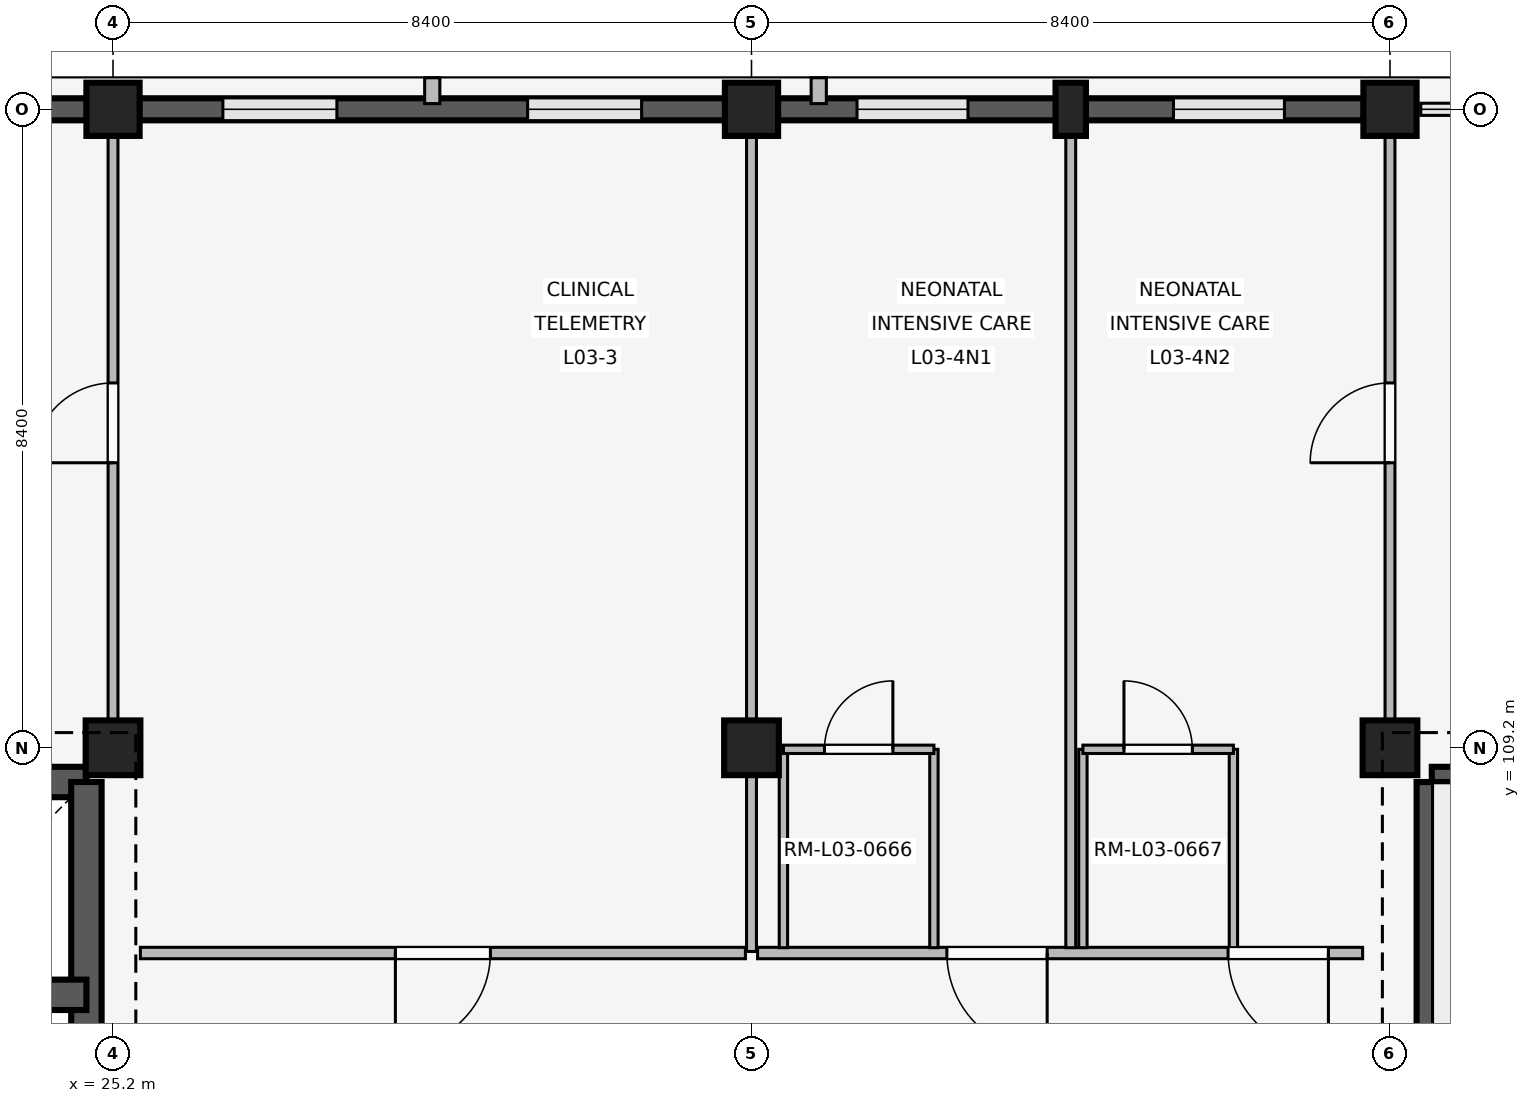
"""IFC4 building model, lengths in metres.
Left out: names, types, materials, properties, quantities, classifications, styles, units other than length and angle.
Written with IfcOpenShell. Run it as: python <this file> out.ifc"""

import sys

from ifc_helpers import new_model, si_unit, direction, frame, frame_2d, origin, origin_2d, place, context, subcontext, project, spatial, rectangle, extrude, element, fill, save


model = new_model("IFC4")
c1 = context("Model", 3, precision=1e-05, world=origin(), true_north=direction((0.0, 1.0)))
c2 = subcontext(c1, "Body", "Model", "MODEL_VIEW")
j1 = project(units=[si_unit("LENGTHUNIT", "METRE"), si_unit("PLANEANGLEUNIT", "RADIAN")], contexts=[c1])
p1 = place(None, origin())
s1 = spatial("IfcSite", under=j1, at=p1, CompositionType="ELEMENT")
p2 = place(p1, origin())
s2 = spatial("IfcBuilding", under=s1, at=p2, CompositionType="ELEMENT")
p3 = place(p2, frame((0.0, 0.0, 12.9)))
s3 = spatial("IfcBuildingStorey", under=s2, at=p3, CompositionType="ELEMENT", Elevation=12.9)
p4 = place(p3, frame((25.2, 109.2, 0.0), z_axis=(0.0, 0.0, 1.0), x_axis=(1.0, 0.0, 0.0)))
e1 = element("IfcColumn", 1, at=p4, inside=s3, PredefinedType="COLUMN", context=c2, shape_type="SweptSolid", body=[
    extrude(rectangle(XDim=0.72, YDim=0.72, at=origin_2d()), origin(), (0.0, 0.0, 1.0), 3.3),
])
p5 = place(p3, frame((25.2, 117.6, 0.0), z_axis=(0.0, 0.0, 1.0), x_axis=(1.0, 0.0, 0.0)))
e2 = element("IfcColumn", 2, at=p5, inside=s3, PredefinedType="COLUMN", context=c2, shape_type="SweptSolid", body=[
    extrude(rectangle(XDim=0.7, YDim=0.7, at=origin_2d()), origin(), (0.0, 0.0, 1.0), 3.3),
])
p6 = place(p3, frame((33.6, 109.2, 0.0), z_axis=(0.0, 0.0, 1.0), x_axis=(1.0, 0.0, 0.0)))
e3 = element("IfcColumn", 3, at=p6, inside=s3, PredefinedType="COLUMN", context=c2, shape_type="SweptSolid", body=[
    extrude(rectangle(XDim=0.72, YDim=0.72, at=origin_2d()), origin(), (0.0, 0.0, 1.0), 3.3),
])
p7 = place(p3, frame((33.6, 117.6, 0.0), z_axis=(0.0, 0.0, 1.0), x_axis=(1.0, 0.0, 0.0)))
e4 = element("IfcColumn", 4, at=p7, inside=s3, PredefinedType="COLUMN", context=c2, shape_type="SweptSolid", body=[
    extrude(rectangle(XDim=0.7, YDim=0.7, at=origin_2d()), origin(), (0.0, 0.0, 1.0), 3.3),
])
p8 = place(p3, frame((42.0, 109.2, 0.0), z_axis=(0.0, 0.0, 1.0), x_axis=(1.0, 0.0, 0.0)))
e5 = element("IfcColumn", 5, at=p8, inside=s3, PredefinedType="COLUMN", context=c2, shape_type="SweptSolid", body=[
    extrude(rectangle(XDim=0.72, YDim=0.72, at=origin_2d()), origin(), (0.0, 0.0, 1.0), 3.3),
])
p9 = place(p3, frame((42.0, 117.6, 0.0), z_axis=(0.0, 0.0, 1.0), x_axis=(1.0, 0.0, 0.0)))
e6 = element("IfcColumn", 6, at=p9, inside=s3, PredefinedType="COLUMN", context=c2, shape_type="SweptSolid", body=[
    extrude(rectangle(XDim=0.7, YDim=0.7, at=origin_2d()), origin(), (0.0, 0.0, 1.0), 3.3),
])
p10 = place(p3, frame((37.8, 117.6, 0.0), z_axis=(0.0, 0.0, 1.0), x_axis=(1.0, 0.0, 0.0)))
e7 = element("IfcColumn", 7, at=p10, inside=s3, PredefinedType="PILASTER", context=c2, shape_type="SweptSolid", body=[
    extrude(rectangle(XDim=0.4, YDim=0.7, at=origin_2d()), origin(), (0.0, 0.0, 1.0), 3.3),
])
p11 = place(p3, frame((17.145, 117.6, 0.0), z_axis=(0.0, 0.0, 1.0), x_axis=(1.0, 0.0, 0.0)))
e8 = element("IfcWall", 8, at=p11, inside=s3, PredefinedType="SOLIDWALL", context=c2, shape_type="SweptSolid", body=[
    extrude(rectangle(XDim=7.71, YDim=0.29, at=frame_2d((3.855, 0.0))), origin(), (0.0, 0.0, 1.0), 2.44),
])
p12 = place(p11, frame((1.123, 0.0, 1.05)))
e9 = element("IfcOpeningElement", 9, at=p12, cuts=e8, PredefinedType="OPENING", context=c2, shape_type="SweptSolid", body=[
    extrude(rectangle(XDim=1.3, YDim=0.75, at=frame_2d((0.65, 0.375))), frame((0.0, 0.155, 0.0), z_axis=(0.0, -1.0, 0.0), x_axis=(1.0, 0.0, 0.0)), (0.0, 0.0, 1.0), 0.31),
])
p13 = place(p11, frame((5.287, 0.0, 1.05)))
e10 = element("IfcOpeningElement", 10, at=p13, cuts=e8, PredefinedType="OPENING", context=c2, shape_type="SweptSolid", body=[
    extrude(rectangle(XDim=1.3, YDim=0.75, at=frame_2d((0.65, 0.375))), frame((0.0, 0.155, 0.0), z_axis=(0.0, -1.0, 0.0), x_axis=(1.0, 0.0, 0.0)), (0.0, 0.0, 1.0), 0.31),
])
p14 = place(p3, frame((25.545, 117.6, 0.0), z_axis=(0.0, 0.0, 1.0), x_axis=(1.0, 0.0, 0.0)))
e11 = element("IfcWall", 11, at=p14, inside=s3, PredefinedType="SOLIDWALL", context=c2, shape_type="SweptSolid", body=[
    extrude(rectangle(XDim=7.71, YDim=0.29, at=frame_2d((3.855, 0.0))), origin(), (0.0, 0.0, 1.0), 2.44),
])
p15 = place(p14, frame((1.1, 0.0, 1.05)))
e12 = element("IfcOpeningElement", 12, at=p15, cuts=e11, PredefinedType="OPENING", context=c2, shape_type="SweptSolid", body=[
    extrude(rectangle(XDim=1.5, YDim=0.75, at=frame_2d((0.75, 0.375))), frame((0.0, 0.155, 0.0), z_axis=(0.0, -1.0, 0.0), x_axis=(1.0, 0.0, 0.0)), (0.0, 0.0, 1.0), 0.31),
])
p16 = place(p14, frame((5.11, 0.0, 1.05)))
e13 = element("IfcOpeningElement", 13, at=p16, cuts=e11, PredefinedType="OPENING", context=c2, shape_type="SweptSolid", body=[
    extrude(rectangle(XDim=1.5, YDim=0.75, at=frame_2d((0.75, 0.375))), frame((0.0, 0.155, 0.0), z_axis=(0.0, -1.0, 0.0), x_axis=(1.0, 0.0, 0.0)), (0.0, 0.0, 1.0), 0.31),
])
p17 = place(p3, frame((29.4, 117.675, 0.0), z_axis=(0.0, 0.0, 1.0), x_axis=(0.0, 1.0, 0.0)))
e14 = element("IfcWall", 14, at=p17, inside=s3, PredefinedType="ELEMENTEDWALL", context=c2, shape_type="SweptSolid", body=[
    extrude(rectangle(XDim=0.34, YDim=0.2, at=frame_2d((0.17, 0.0))), origin(), (0.0, 0.0, 1.0), 2.42),
])
p18 = place(p3, frame((33.945, 117.6, 0.0), z_axis=(0.0, 0.0, 1.0), x_axis=(1.0, 0.0, 0.0)))
e15 = element("IfcWall", 15, at=p18, inside=s3, PredefinedType="SOLIDWALL", context=c2, shape_type="SweptSolid", body=[
    extrude(rectangle(XDim=7.71, YDim=0.29, at=frame_2d((3.855, 0.0))), origin(), (0.0, 0.0, 1.0), 2.44),
])
p19 = place(p18, frame((1.043, 0.0, 0.85)))
e16 = element("IfcOpeningElement", 16, at=p19, cuts=e15, PredefinedType="OPENING", context=c2, shape_type="SweptSolid", body=[
    extrude(rectangle(XDim=1.46, YDim=0.85, at=frame_2d((0.73, 0.425))), frame((0.0, 0.155, 0.0), z_axis=(0.0, -1.0, 0.0), x_axis=(1.0, 0.0, 0.0)), (0.0, 0.0, 1.0), 0.31),
])
p20 = place(p18, frame((5.207, 0.0, 0.85)))
e17 = element("IfcOpeningElement", 17, at=p20, cuts=e15, PredefinedType="OPENING", context=c2, shape_type="SweptSolid", body=[
    extrude(rectangle(XDim=1.46, YDim=0.85, at=frame_2d((0.73, 0.425))), frame((0.0, 0.155, 0.0), z_axis=(0.0, -1.0, 0.0), x_axis=(1.0, 0.0, 0.0)), (0.0, 0.0, 1.0), 0.31),
])
p21 = place(p3, frame((34.485, 117.675, 0.0), z_axis=(0.0, 0.0, 1.0), x_axis=(0.0, 1.0, 0.0)))
e18 = element("IfcWall", 18, at=p21, inside=s3, PredefinedType="ELEMENTEDWALL", context=c2, shape_type="SweptSolid", body=[
    extrude(rectangle(XDim=0.34, YDim=0.2, at=frame_2d((0.17, 0.0))), origin(), (0.0, 0.0, 1.0), 2.42),
])
p22 = place(p3, frame((42.55, 108.75, 0.0), z_axis=(0.0, 0.0, 1.0), x_axis=(1.0, 0.0, 0.0)))
e19 = element("IfcWall", 19, at=p22, inside=s3, PredefinedType="SHEAR", context=c2, shape_type="SweptSolid", body=[
    extrude(rectangle(XDim=7.5, YDim=0.4, at=frame_2d((3.75, 0.0))), origin(), (0.0, 0.0, 1.0), 3.02),
])
p23 = place(p3, frame((42.55, 101.2, 0.0), z_axis=(0.0, 0.0, 1.0), x_axis=(0.0, 1.0, 0.0)))
e20 = element("IfcWall", 20, at=p23, inside=s3, PredefinedType="SHEAR", context=c2, shape_type="SweptSolid", body=[
    extrude(rectangle(XDim=7.55, YDim=0.4, at=frame_2d((3.775, 0.0))), origin(), (0.0, 0.0, 1.0), 3.02),
])
p24 = place(p23, frame((0.28, 0.0, 0.0)))
e21 = element("IfcOpeningElement", 21, at=p24, cuts=e20, PredefinedType="OPENING", context=c2, shape_type="SweptSolid", body=[
    extrude(rectangle(XDim=1.0, YDim=2.15, at=frame_2d((0.5, 1.075))), frame((0.0, 0.21, 0.0), z_axis=(0.0, -1.0, 0.0), x_axis=(1.0, 0.0, 0.0)), (0.0, 0.0, 1.0), 0.42),
])
p25 = place(p3, frame((17.35, 108.75, 0.0), z_axis=(0.0, 0.0, 1.0), x_axis=(1.0, 0.0, 0.0)))
e22 = element("IfcWall", 22, at=p25, inside=s3, PredefinedType="SHEAR", context=c2, shape_type="SweptSolid", body=[
    extrude(rectangle(XDim=7.5, YDim=0.4, at=frame_2d((3.75, 0.0))), origin(), (0.0, 0.0, 1.0), 3.02),
])
p26 = place(p3, frame((24.85, 101.2, 0.0), z_axis=(0.0, 0.0, 1.0), x_axis=(0.0, 1.0, 0.0)))
e23 = element("IfcWall", 23, at=p26, inside=s3, PredefinedType="SHEAR", context=c2, shape_type="SweptSolid", body=[
    extrude(rectangle(XDim=7.55, YDim=0.4, at=frame_2d((3.775, 0.0))), origin(), (0.0, 0.0, 1.0), 3.02),
])
p27 = place(p26, frame((2.4, 0.0, 0.0)))
e24 = element("IfcOpeningElement", 24, at=p27, cuts=e23, PredefinedType="OPENING", context=c2, shape_type="SweptSolid", body=[
    extrude(rectangle(XDim=1.2, YDim=2.2, at=frame_2d((0.6, 1.1))), frame((0.0, 0.21, 0.0), z_axis=(0.0, -1.0, 0.0), x_axis=(1.0, 0.0, 0.0)), (0.0, 0.0, 1.0), 0.42),
])
p28 = place(p3, frame((21.05, 105.95, 0.0), z_axis=(0.0, 0.0, 1.0), x_axis=(1.0, 0.0, 0.0)))
e25 = element("IfcWall", 25, at=p28, inside=s3, PredefinedType="SHEAR", context=c2, shape_type="SweptSolid", body=[
    extrude(rectangle(XDim=3.8, YDim=0.4, at=frame_2d((1.9, 0.0))), origin(), (0.0, 0.0, 1.0), 3.02),
])
p29 = place(p28, frame((0.32, 0.0, 0.0)))
e26 = element("IfcOpeningElement", 26, at=p29, cuts=e25, PredefinedType="OPENING", context=c2, shape_type="SweptSolid", body=[
    extrude(rectangle(XDim=1.1, YDim=2.15, at=frame_2d((0.55, 1.075))), frame((0.0, 0.21, 0.0), z_axis=(0.0, -1.0, 0.0), x_axis=(1.0, 0.0, 0.0)), (0.0, 0.0, 1.0), 0.42),
])
p30 = place(p3, frame((25.2, 109.55, 0.0), z_axis=(0.0, 0.0, 1.0), x_axis=(0.0, 1.0, 0.0)))
e27 = element("IfcWall", 27, at=p30, inside=s3, PredefinedType="PARTITIONING", context=c2, shape_type="SweptSolid", body=[
    extrude(rectangle(XDim=7.91, YDim=0.13, at=frame_2d((3.955, 0.0))), origin(), (0.0, 0.0, 1.0), 2.42),
])
p31 = place(p30, frame((3.4, 0.0, 0.0)))
e28 = element("IfcOpeningElement", 28, at=p31, cuts=e27, PredefinedType="OPENING", context=c2, shape_type="SweptSolid", body=[
    extrude(rectangle(XDim=1.05, YDim=2.2, at=frame_2d((0.525, 1.1))), frame((0.0, 0.075, 0.0), z_axis=(0.0, -1.0, 0.0), x_axis=(1.0, 0.0, 0.0)), (0.0, 0.0, 1.0), 0.15),
])
p32 = place(p3, frame((33.52, 106.5, 0.0), z_axis=(0.0, 0.0, 1.0), x_axis=(-1.0, 0.0, 0.0)))
e29 = element("IfcWall", 29, at=p32, inside=s3, PredefinedType="PARTITIONING", context=c2, shape_type="SweptSolid", body=[
    extrude(rectangle(XDim=7.96, YDim=0.15, at=frame_2d((3.98, 0.0))), origin(), (0.0, 0.0, 1.0), 2.42),
])
p33 = place(p32, frame((3.355, 0.0, 0.0)))
e30 = element("IfcOpeningElement", 30, at=p33, cuts=e29, PredefinedType="OPENING", context=c2, shape_type="SweptSolid", body=[
    extrude(rectangle(XDim=1.25, YDim=2.2, at=frame_2d((0.625, 1.1))), frame((0.0, 0.085, 0.0), z_axis=(0.0, -1.0, 0.0), x_axis=(1.0, 0.0, 0.0)), (0.0, 0.0, 1.0), 0.17),
])
p34 = place(p3, frame((33.6, 106.52, 0.0), z_axis=(0.0, 0.0, 1.0), x_axis=(0.0, 1.0, 0.0)))
e31 = element("IfcWall", 31, at=p34, inside=s3, PredefinedType="PARTITIONING", context=c2, shape_type="SweptSolid", body=[
    extrude(rectangle(XDim=10.94, YDim=0.13, at=frame_2d((5.47, 0.0))), origin(), (0.0, 0.0, 1.0), 2.42),
])
p35 = place(p3, frame((41.64, 106.5, 0.0), z_axis=(0.0, 0.0, 1.0), x_axis=(-1.0, 0.0, 0.0)))
e32 = element("IfcWall", 32, at=p35, inside=s3, PredefinedType="PARTITIONING", context=c2, shape_type="SweptSolid", body=[
    extrude(rectangle(XDim=7.96, YDim=0.15, at=frame_2d((3.98, 0.0))), origin(), (0.0, 0.0, 1.0), 2.42),
])
p36 = place(p35, frame((0.45, 0.0, 0.0)))
e33 = element("IfcOpeningElement", 33, at=p36, cuts=e32, PredefinedType="OPENING", context=c2, shape_type="SweptSolid", body=[
    extrude(rectangle(XDim=1.32, YDim=2.25, at=frame_2d((0.66, 1.125))), frame((0.0, 0.085, 0.0), z_axis=(0.0, -1.0, 0.0), x_axis=(1.0, 0.0, 0.0)), (0.0, 0.0, 1.0), 0.17),
])
p37 = place(p35, frame((4.15, 0.0, 0.0)))
e34 = element("IfcOpeningElement", 34, at=p37, cuts=e32, PredefinedType="OPENING", context=c2, shape_type="SweptSolid", body=[
    extrude(rectangle(XDim=1.32, YDim=2.25, at=frame_2d((0.66, 1.125))), frame((0.0, 0.085, 0.0), z_axis=(0.0, -1.0, 0.0), x_axis=(1.0, 0.0, 0.0)), (0.0, 0.0, 1.0), 0.17),
])
p38 = place(p3, frame((37.8, 106.57, 0.0), z_axis=(0.0, 0.0, 1.0), x_axis=(0.0, 1.0, 0.0)))
e35 = element("IfcWall", 35, at=p38, inside=s3, PredefinedType="PARTITIONING", context=c2, shape_type="SweptSolid", body=[
    extrude(rectangle(XDim=10.93, YDim=0.13, at=frame_2d((5.465, 0.0))), origin(), (0.0, 0.0, 1.0), 2.42),
])
for number, where, z_axis, x_axis in (
    (36, (34.02, 106.57, 0.0), (0.0, 0.0, 1.0), (0.0, 1.0, 0.0)),
    (37, (36.0, 106.57, 0.0), (0.0, 0.0, 1.0), (0.0, 1.0, 0.0)),
):
    element("IfcWall", number, at=place(p3, frame(where, z_axis=z_axis, x_axis=x_axis)), inside=s3, PredefinedType="PARTITIONING", context=c2, shape_type="SweptSolid", body=[
        extrude(rectangle(XDim=2.61, YDim=0.11, at=frame_2d((1.305, 0.0))), origin(), (0.0, 0.0, 1.0), 2.42),
    ])
p39 = place(p3, frame((34.02, 109.18, 0.0), z_axis=(0.0, 0.0, 1.0), x_axis=(1.0, 0.0, 0.0)))
e38 = element("IfcWall", 38, at=p39, inside=s3, PredefinedType="PARTITIONING", context=c2, shape_type="SweptSolid", body=[
    extrude(rectangle(XDim=1.98, YDim=0.11, at=frame_2d((0.99, 0.0))), origin(), (0.0, 0.0, 1.0), 2.42),
])
p40 = place(p39, frame((0.54, 0.0, 0.0)))
e39 = element("IfcOpeningElement", 39, at=p40, cuts=e38, PredefinedType="OPENING", context=c2, shape_type="SweptSolid", body=[
    extrude(rectangle(XDim=0.9, YDim=2.1, at=frame_2d((0.45, 1.05))), frame((0.0, 0.065, 0.0), z_axis=(0.0, -1.0, 0.0), x_axis=(1.0, 0.0, 0.0)), (0.0, 0.0, 1.0), 0.13),
])
for number, where, z_axis, x_axis in (
    (40, (37.96, 106.57, 0.0), (0.0, 0.0, 1.0), (0.0, 1.0, 0.0)),
    (41, (39.94, 106.57, 0.0), (0.0, 0.0, 1.0), (0.0, 1.0, 0.0)),
):
    element("IfcWall", number, at=place(p3, frame(where, z_axis=z_axis, x_axis=x_axis)), inside=s3, PredefinedType="PARTITIONING", context=c2, shape_type="SweptSolid", body=[
        extrude(rectangle(XDim=2.61, YDim=0.11, at=frame_2d((1.305, 0.0))), origin(), (0.0, 0.0, 1.0), 2.42),
    ])
p41 = place(p3, frame((37.96, 109.18, 0.0), z_axis=(0.0, 0.0, 1.0), x_axis=(1.0, 0.0, 0.0)))
e42 = element("IfcWall", 42, at=p41, inside=s3, PredefinedType="PARTITIONING", context=c2, shape_type="SweptSolid", body=[
    extrude(rectangle(XDim=1.98, YDim=0.11, at=frame_2d((0.99, 0.0))), origin(), (0.0, 0.0, 1.0), 2.42),
])
p42 = place(p41, frame((0.54, 0.0, 0.0)))
e43 = element("IfcOpeningElement", 43, at=p42, cuts=e42, PredefinedType="OPENING", context=c2, shape_type="SweptSolid", body=[
    extrude(rectangle(XDim=0.9, YDim=2.1, at=frame_2d((0.45, 1.05))), frame((0.0, 0.065, 0.0), z_axis=(0.0, -1.0, 0.0), x_axis=(1.0, 0.0, 0.0)), (0.0, 0.0, 1.0), 0.13),
])
p43 = place(p3, frame((42.0, 109.55, 0.0), z_axis=(0.0, 0.0, 1.0), x_axis=(0.0, 1.0, 0.0)))
e44 = element("IfcWall", 44, at=p43, inside=s3, PredefinedType="PARTITIONING", context=c2, shape_type="SweptSolid", body=[
    extrude(rectangle(XDim=7.91, YDim=0.13, at=frame_2d((3.955, 0.0))), origin(), (0.0, 0.0, 1.0), 2.42),
])
p44 = place(p43, frame((3.4, 0.0, 0.0)))
e45 = element("IfcOpeningElement", 45, at=p44, cuts=e44, PredefinedType="OPENING", context=c2, shape_type="SweptSolid", body=[
    extrude(rectangle(XDim=1.05, YDim=2.2, at=frame_2d((0.525, 1.1))), frame((0.0, 0.075, 0.0), z_axis=(0.0, -1.0, 0.0), x_axis=(1.0, 0.0, 0.0)), (0.0, 0.0, 1.0), 0.15),
])
p45 = place(p15, origin())
e46 = element("IfcWindow", 46, at=p45, inside=s3, PartitioningType="SINGLE_PANEL", PredefinedType="WINDOW", context=c2, shape_type="SweptSolid", body=[
    extrude(rectangle(XDim=1.5, YDim=0.75, at=frame_2d((0.75, 0.375))), frame((0.0, 0.03, 0.0), z_axis=(0.0, -1.0, 0.0), x_axis=(1.0, 0.0, 0.0)), (0.0, 0.0, 1.0), 0.06),
])
fill(e12, e46)
p46 = place(p16, origin())
e47 = element("IfcWindow", 47, at=p46, inside=s3, PartitioningType="SINGLE_PANEL", PredefinedType="WINDOW", context=c2, shape_type="SweptSolid", body=[
    extrude(rectangle(XDim=1.5, YDim=0.75, at=frame_2d((0.75, 0.375))), frame((0.0, 0.03, 0.0), z_axis=(0.0, -1.0, 0.0), x_axis=(1.0, 0.0, 0.0)), (0.0, 0.0, 1.0), 0.06),
])
fill(e13, e47)
p47 = place(p19, origin())
e48 = element("IfcWindow", 48, at=p47, inside=s3, PartitioningType="SINGLE_PANEL", PredefinedType="WINDOW", context=c2, shape_type="SweptSolid", body=[
    extrude(rectangle(XDim=1.46, YDim=0.85, at=frame_2d((0.73, 0.425))), frame((0.0, 0.03, 0.0), z_axis=(0.0, -1.0, 0.0), x_axis=(1.0, 0.0, 0.0)), (0.0, 0.0, 1.0), 0.06),
])
fill(e16, e48)
p48 = place(p20, origin())
e49 = element("IfcWindow", 49, at=p48, inside=s3, PartitioningType="SINGLE_PANEL", PredefinedType="WINDOW", context=c2, shape_type="SweptSolid", body=[
    extrude(rectangle(XDim=1.46, YDim=0.85, at=frame_2d((0.73, 0.425))), frame((0.0, 0.03, 0.0), z_axis=(0.0, -1.0, 0.0), x_axis=(1.0, 0.0, 0.0)), (0.0, 0.0, 1.0), 0.06),
])
fill(e17, e49)
p49 = place(p31, origin())
e50 = element("IfcDoor", 50, at=p49, inside=s3, OperationType="SINGLE_SWING_LEFT", PredefinedType="DOOR", context=c2, shape_type="SweptSolid", body=[
    extrude(rectangle(XDim=1.05, YDim=2.2, at=frame_2d((0.525, 1.1))), frame((0.0, 0.025, 0.0), z_axis=(0.0, -1.0, 0.0), x_axis=(1.0, 0.0, 0.0)), (0.0, 0.0, 1.0), 0.05),
])
fill(e28, e50)
p50 = place(p33, origin())
e51 = element("IfcDoor", 51, at=p50, inside=s3, OperationType="SINGLE_SWING_RIGHT", PredefinedType="DOOR", context=c2, shape_type="SweptSolid", body=[
    extrude(rectangle(XDim=1.25, YDim=2.2, at=frame_2d((0.625, 1.1))), frame((0.0, 0.025, 0.0), z_axis=(0.0, -1.0, 0.0), x_axis=(1.0, 0.0, 0.0)), (0.0, 0.0, 1.0), 0.05),
])
fill(e30, e51)
p51 = place(p36, origin())
e52 = element("IfcDoor", 52, at=p51, inside=s3, OperationType="SINGLE_SWING_LEFT", PredefinedType="DOOR", context=c2, shape_type="SweptSolid", body=[
    extrude(rectangle(XDim=1.32, YDim=2.25, at=frame_2d((0.66, 1.125))), frame((0.0, 0.025, 0.0), z_axis=(0.0, -1.0, 0.0), x_axis=(1.0, 0.0, 0.0)), (0.0, 0.0, 1.0), 0.05),
])
fill(e33, e52)
p52 = place(p37, origin())
e53 = element("IfcDoor", 53, at=p52, inside=s3, OperationType="SINGLE_SWING_LEFT", PredefinedType="DOOR", context=c2, shape_type="SweptSolid", body=[
    extrude(rectangle(XDim=1.32, YDim=2.25, at=frame_2d((0.66, 1.125))), frame((0.0, 0.025, 0.0), z_axis=(0.0, -1.0, 0.0), x_axis=(1.0, 0.0, 0.0)), (0.0, 0.0, 1.0), 0.05),
])
fill(e34, e53)
p53 = place(p40, origin())
e54 = element("IfcDoor", 54, at=p53, inside=s3, OperationType="SINGLE_SWING_RIGHT", PredefinedType="DOOR", context=c2, shape_type="SweptSolid", body=[
    extrude(rectangle(XDim=0.9, YDim=2.1, at=frame_2d((0.45, 1.05))), frame((0.0, 0.025, 0.0), z_axis=(0.0, -1.0, 0.0), x_axis=(1.0, 0.0, 0.0)), (0.0, 0.0, 1.0), 0.05),
])
fill(e39, e54)
p54 = place(p42, origin())
e55 = element("IfcDoor", 55, at=p54, inside=s3, OperationType="SINGLE_SWING_LEFT", PredefinedType="DOOR", context=c2, shape_type="SweptSolid", body=[
    extrude(rectangle(XDim=0.9, YDim=2.1, at=frame_2d((0.45, 1.05))), frame((0.0, 0.025, 0.0), z_axis=(0.0, -1.0, 0.0), x_axis=(1.0, 0.0, 0.0)), (0.0, 0.0, 1.0), 0.05),
])
fill(e43, e55)
p55 = place(p44, origin())
e56 = element("IfcDoor", 56, at=p55, inside=s3, OperationType="SINGLE_SWING_LEFT", PredefinedType="DOOR", context=c2, shape_type="SweptSolid", body=[
    extrude(rectangle(XDim=1.05, YDim=2.2, at=frame_2d((0.525, 1.1))), frame((0.0, 0.025, 0.0), z_axis=(0.0, -1.0, 0.0), x_axis=(1.0, 0.0, 0.0)), (0.0, 0.0, 1.0), 0.05),
])
fill(e45, e56)
save(model, sys.argv[1])
